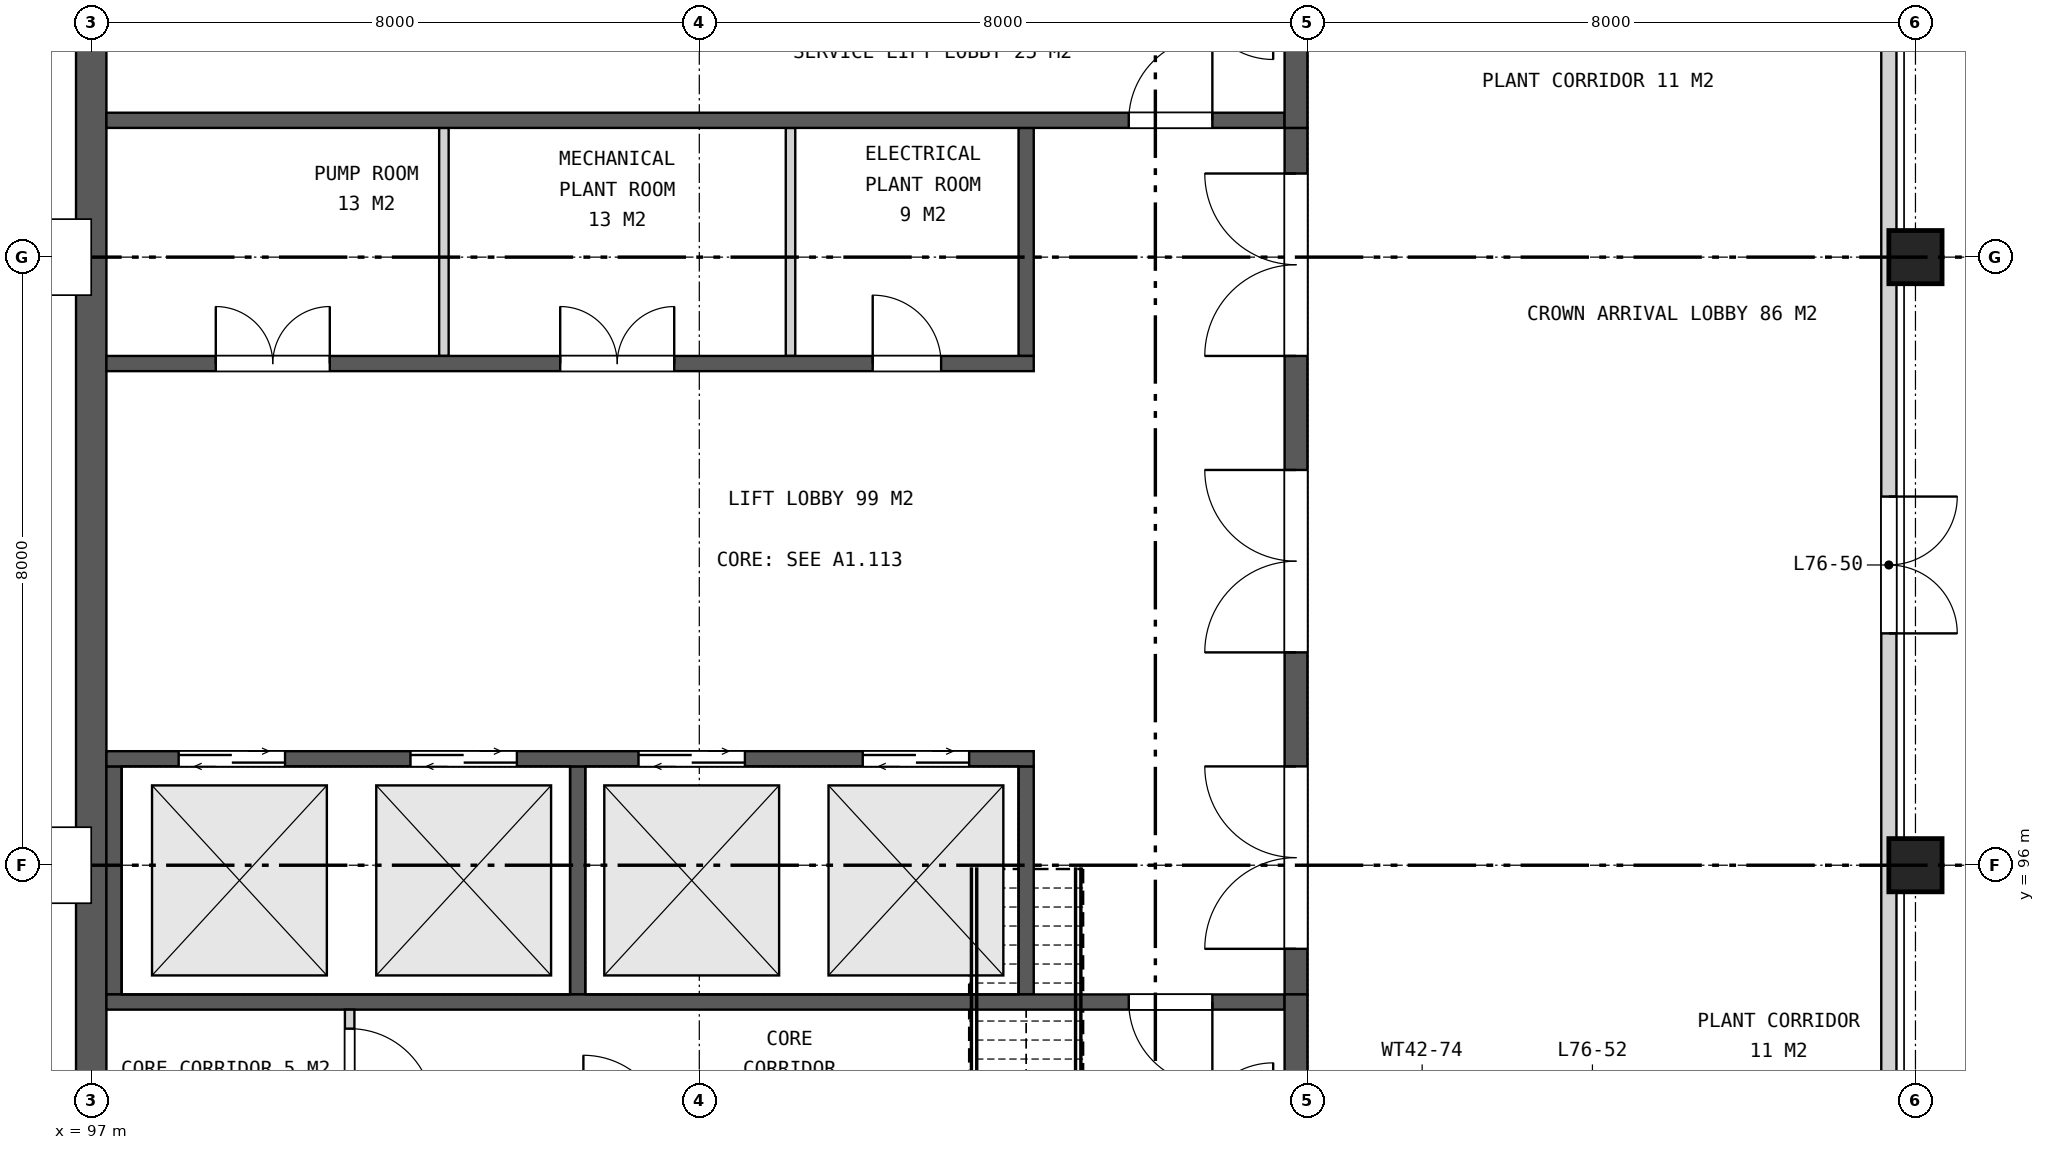
"""IFC4 building model, lengths in metres.
Left out: names, types, materials, properties, quantities, classifications, styles, units other than length and angle.
Written with IfcOpenShell. Run it as: python <this file> out.ifc"""

import sys

from ifc_helpers import new_model, si_unit, direction, frame, frame_2d, origin, origin_2d, place, context, subcontext, project, spatial, rectangle, extrude, element, fill, save


model = new_model("IFC4")
c1 = context("Model", 3, precision=1e-05, world=origin(), true_north=direction((0.0, 1.0)))
c2 = subcontext(c1, "Body", "Model", "MODEL_VIEW")
j1 = project(units=[si_unit("LENGTHUNIT", "METRE"), si_unit("PLANEANGLEUNIT", "RADIAN")], contexts=[c1])
p1 = place(None, origin())
s1 = spatial("IfcSite", under=j1, at=p1, CompositionType="ELEMENT")
p2 = place(p1, origin())
s2 = spatial("IfcBuilding", under=s1, at=p2, CompositionType="ELEMENT")
p3 = place(p2, frame((0.0, 0.0, 349.1)))
s3 = spatial("IfcBuildingStorey", under=s2, at=p3, CompositionType="ELEMENT", Elevation=349.1)
for number, where, z_axis, x_axis in (
    (1, (121.0, 96.0, 0.0), (0.0, 0.0, 1.0), (1.0, 0.0, 0.0)),
    (2, (121.0, 104.0, 0.0), (0.0, 0.0, 1.0), (1.0, 0.0, 0.0)),
):
    element("IfcColumn", number, at=place(p3, frame(where, z_axis=z_axis, x_axis=x_axis)), inside=s3, PredefinedType="COLUMN", context=c2, shape_type="SweptSolid", body=[
        extrude(rectangle(XDim=0.7, YDim=0.7, at=origin_2d()), origin(), (0.0, 0.0, 1.0), 10.23),
    ])
p4 = place(p3, frame((97.0, 111.8, 0.0), z_axis=(0.0, 0.0, 1.0), x_axis=(0.0, -1.0, 0.0)))
e3 = element("IfcWall", 3, at=p4, inside=s3, PredefinedType="SHEAR", context=c2, shape_type="SweptSolid", body=[
    extrude(rectangle(XDim=23.6, YDim=0.4, at=frame_2d((11.8, 0.0))), origin(), (0.0, 0.0, 1.0), 12.0),
])
p5 = place(p3, frame((112.85, 105.7, 0.0), z_axis=(0.0, 0.0, 1.0), x_axis=(0.0, -1.0, 0.0)))
e4 = element("IfcWall", 4, at=p5, inside=s3, PredefinedType="SHEAR", context=c2, shape_type="SweptSolid", body=[
    extrude(rectangle(XDim=11.4, YDim=0.3, at=frame_2d((5.7, 0.0))), origin(), (0.0, 0.0, 1.0), 12.0),
])
p6 = place(p5, frame((0.6, 0.0, 0.0)))
e5 = element("IfcOpeningElement", 5, at=p6, cuts=e4, PredefinedType="OPENING", context=c2, shape_type="SweptSolid", body=[
    extrude(rectangle(XDim=2.4, YDim=2.4, at=frame_2d((1.2, 1.2))), frame((0.0, 0.16, 0.0), z_axis=(0.0, -1.0, 0.0), x_axis=(1.0, 0.0, 0.0)), (0.0, 0.0, 1.0), 0.32),
])
p7 = place(p5, frame((4.5, 0.0, 0.0)))
e6 = element("IfcOpeningElement", 6, at=p7, cuts=e4, PredefinedType="OPENING", context=c2, shape_type="SweptSolid", body=[
    extrude(rectangle(XDim=2.4, YDim=2.4, at=frame_2d((1.2, 1.2))), frame((0.0, 0.16, 0.0), z_axis=(0.0, -1.0, 0.0), x_axis=(1.0, 0.0, 0.0)), (0.0, 0.0, 1.0), 0.32),
])
p8 = place(p5, frame((8.4, 0.0, 0.0)))
e7 = element("IfcOpeningElement", 7, at=p8, cuts=e4, PredefinedType="OPENING", context=c2, shape_type="SweptSolid", body=[
    extrude(rectangle(XDim=2.4, YDim=2.4, at=frame_2d((1.2, 1.2))), frame((0.0, 0.16, 0.0), z_axis=(0.0, -1.0, 0.0), x_axis=(1.0, 0.0, 0.0)), (0.0, 0.0, 1.0), 0.32),
])
for number, where, z_axis, x_axis in (
    (8, (109.3, 97.3, 0.0), (0.0, 0.0, 1.0), (0.0, -1.0, 0.0)),
    (9, (103.4, 97.3, 0.0), (0.0, 0.0, 1.0), (0.0, -1.0, 0.0)),
    (10, (97.3, 97.3, 0.0), (0.0, 0.0, 1.0), (0.0, -1.0, 0.0)),
):
    element("IfcWall", number, at=place(p3, frame(where, z_axis=z_axis, x_axis=x_axis)), inside=s3, PredefinedType="SHEAR", context=c2, shape_type="SweptSolid", body=[
        extrude(rectangle(XDim=3.0, YDim=0.2, at=frame_2d((1.5, 0.0))), origin(), (0.0, 0.0, 1.0), 9.2),
    ])
p9 = place(p3, frame((109.4, 97.4, 0.0), z_axis=(0.0, 0.0, 1.0), x_axis=(-1.0, 0.0, 0.0)))
e11 = element("IfcWall", 11, at=p9, inside=s3, PredefinedType="SHEAR", context=c2, shape_type="SweptSolid", body=[
    extrude(rectangle(XDim=12.2, YDim=0.2, at=frame_2d((6.1, 0.0))), origin(), (0.0, 0.0, 1.0), 9.2),
])
p10 = place(p9, frame((0.85, 0.0, 0.0)))
e12 = element("IfcOpeningElement", 12, at=p10, cuts=e11, PredefinedType="OPENING", context=c2, shape_type="SweptSolid", body=[
    extrude(rectangle(XDim=1.4, YDim=2.1, at=frame_2d((0.7, 1.05))), frame((0.0, 0.11, 0.0), z_axis=(0.0, -1.0, 0.0), x_axis=(1.0, 0.0, 0.0)), (0.0, 0.0, 1.0), 0.22),
])
p11 = place(p9, frame((3.8, 0.0, 0.0)))
e13 = element("IfcOpeningElement", 13, at=p11, cuts=e11, PredefinedType="OPENING", context=c2, shape_type="SweptSolid", body=[
    extrude(rectangle(XDim=1.4, YDim=2.1, at=frame_2d((0.7, 1.05))), frame((0.0, 0.11, 0.0), z_axis=(0.0, -1.0, 0.0), x_axis=(1.0, 0.0, 0.0)), (0.0, 0.0, 1.0), 0.22),
])
p12 = place(p9, frame((6.8, 0.0, 0.0)))
e14 = element("IfcOpeningElement", 14, at=p12, cuts=e11, PredefinedType="OPENING", context=c2, shape_type="SweptSolid", body=[
    extrude(rectangle(XDim=1.4, YDim=2.1, at=frame_2d((0.7, 1.05))), frame((0.0, 0.11, 0.0), z_axis=(0.0, -1.0, 0.0), x_axis=(1.0, 0.0, 0.0)), (0.0, 0.0, 1.0), 0.22),
])
p13 = place(p9, frame((9.85, 0.0, 0.0)))
e15 = element("IfcOpeningElement", 15, at=p13, cuts=e11, PredefinedType="OPENING", context=c2, shape_type="SweptSolid", body=[
    extrude(rectangle(XDim=1.4, YDim=2.1, at=frame_2d((0.7, 1.05))), frame((0.0, 0.11, 0.0), z_axis=(0.0, -1.0, 0.0), x_axis=(1.0, 0.0, 0.0)), (0.0, 0.0, 1.0), 0.22),
])
p14 = place(p3, frame((109.3, 105.7, 0.0), z_axis=(0.0, 0.0, 1.0), x_axis=(0.0, -1.0, 0.0)))
e16 = element("IfcWall", 16, at=p14, inside=s3, PredefinedType="SHEAR", context=c2, shape_type="SweptSolid", body=[
    extrude(rectangle(XDim=3.0, YDim=0.2, at=frame_2d((1.5, 0.0))), origin(), (0.0, 0.0, 1.0), 9.2),
])
for number, where, z_axis, x_axis in (
    (17, (106.2, 105.7, 0.0), (0.0, 0.0, 1.0), (0.0, -1.0, 0.0)),
    (18, (101.64, 105.7, 0.0), (0.0, 0.0, 1.0), (0.0, -1.0, 0.0)),
):
    element("IfcWall", number, at=place(p3, frame(where, z_axis=z_axis, x_axis=x_axis)), inside=s3, PredefinedType="PARTITIONING", context=c2, shape_type="SweptSolid", body=[
        extrude(rectangle(XDim=3.0, YDim=0.125, at=frame_2d((1.5, 0.0))), origin(), (0.0, 0.0, 1.0), 9.2),
    ])
p15 = place(p3, frame((109.4, 102.6, 0.0), z_axis=(0.0, 0.0, 1.0), x_axis=(-1.0, 0.0, 0.0)))
e19 = element("IfcWall", 19, at=p15, inside=s3, PredefinedType="SHEAR", context=c2, shape_type="SweptSolid", body=[
    extrude(rectangle(XDim=12.2, YDim=0.2, at=frame_2d((6.1, 0.0))), origin(), (0.0, 0.0, 1.0), 9.2),
])
p16 = place(p15, frame((1.219, 0.0, 0.0)))
e20 = element("IfcOpeningElement", 20, at=p16, cuts=e19, PredefinedType="OPENING", context=c2, shape_type="SweptSolid", body=[
    extrude(rectangle(XDim=0.9, YDim=2.1, at=frame_2d((0.45, 1.05))), frame((0.0, 0.11, 0.0), z_axis=(0.0, -1.0, 0.0), x_axis=(1.0, 0.0, 0.0)), (0.0, 0.0, 1.0), 0.22),
])
p17 = place(p15, frame((4.73, 0.0, 0.0)))
e21 = element("IfcOpeningElement", 21, at=p17, cuts=e19, PredefinedType="OPENING", context=c2, shape_type="SweptSolid", body=[
    extrude(rectangle(XDim=1.5, YDim=2.1, at=frame_2d((0.75, 1.05))), frame((0.0, 0.11, 0.0), z_axis=(0.0, -1.0, 0.0), x_axis=(1.0, 0.0, 0.0)), (0.0, 0.0, 1.0), 0.22),
])
p18 = place(p15, frame((9.261, 0.0, 0.0)))
e22 = element("IfcOpeningElement", 22, at=p18, cuts=e19, PredefinedType="OPENING", context=c2, shape_type="SweptSolid", body=[
    extrude(rectangle(XDim=1.5, YDim=2.1, at=frame_2d((0.75, 1.05))), frame((0.0, 0.11, 0.0), z_axis=(0.0, -1.0, 0.0), x_axis=(1.0, 0.0, 0.0)), (0.0, 0.0, 1.0), 0.22),
])
p19 = place(p3, frame((112.7, 94.2, 0.0), z_axis=(0.0, 0.0, 1.0), x_axis=(-1.0, 0.0, 0.0)))
e23 = element("IfcWall", 23, at=p19, inside=s3, PredefinedType="SHEAR", context=c2, shape_type="SweptSolid", body=[
    extrude(rectangle(XDim=15.5, YDim=0.2, at=frame_2d((7.75, 0.0))), origin(), (0.0, 0.0, 1.0), 9.2),
])
p20 = place(p19, frame((0.95, 0.0, 0.0)))
e24 = element("IfcOpeningElement", 24, at=p20, cuts=e23, PredefinedType="OPENING", context=c2, shape_type="SweptSolid", body=[
    extrude(rectangle(XDim=1.1, YDim=2.1, at=frame_2d((0.55, 1.05))), frame((0.0, 0.11, 0.0), z_axis=(0.0, -1.0, 0.0), x_axis=(1.0, 0.0, 0.0)), (0.0, 0.0, 1.0), 0.22),
])
p21 = place(p3, frame((112.85, 94.3, 0.0), z_axis=(0.0, 0.0, 1.0), x_axis=(0.0, -1.0, 0.0)))
e25 = element("IfcWall", 25, at=p21, inside=s3, PredefinedType="SHEAR", context=c2, shape_type="SweptSolid", body=[
    extrude(rectangle(XDim=6.05, YDim=0.3, at=frame_2d((3.025, 0.0))), origin(), (0.0, 0.0, 1.0), 12.0),
])
p22 = place(p3, frame((100.4, 94.1, 0.0), z_axis=(0.0, 0.0, 1.0), x_axis=(0.0, -1.0, 0.0)))
e26 = element("IfcWall", 26, at=p22, inside=s3, PredefinedType="PARTITIONING", context=c2, shape_type="SweptSolid", body=[
    extrude(rectangle(XDim=1.6, YDim=0.125, at=frame_2d((0.8, 0.0))), origin(), (0.0, 0.0, 1.0), 9.2),
])
p23 = place(p22, frame((0.25, 0.0, 0.0)))
e27 = element("IfcOpeningElement", 27, at=p23, cuts=e26, PredefinedType="OPENING", context=c2, shape_type="SweptSolid", body=[
    extrude(rectangle(XDim=1.1, YDim=2.1, at=frame_2d((0.55, 1.05))), frame((0.0, 0.073, 0.0), z_axis=(0.0, -1.0, 0.0), x_axis=(1.0, 0.0, 0.0)), (0.0, 0.0, 1.0), 0.145),
])
p24 = place(p3, frame((112.7, 105.8, 0.0), z_axis=(0.0, 0.0, 1.0), x_axis=(-1.0, 0.0, 0.0)))
e28 = element("IfcWall", 28, at=p24, inside=s3, PredefinedType="SHEAR", context=c2, shape_type="SweptSolid", body=[
    extrude(rectangle(XDim=15.5, YDim=0.2, at=frame_2d((7.75, 0.0))), origin(), (0.0, 0.0, 1.0), 9.2),
])
p25 = place(p24, frame((0.95, 0.0, 0.0)))
e29 = element("IfcOpeningElement", 29, at=p25, cuts=e28, PredefinedType="OPENING", context=c2, shape_type="SweptSolid", body=[
    extrude(rectangle(XDim=1.1, YDim=2.1, at=frame_2d((0.55, 1.05))), frame((0.0, 0.11, 0.0), z_axis=(0.0, -1.0, 0.0), x_axis=(1.0, 0.0, 0.0)), (0.0, 0.0, 1.0), 0.22),
])
p26 = place(p3, frame((112.85, 111.75, 0.0), z_axis=(0.0, 0.0, 1.0), x_axis=(0.0, -1.0, 0.0)))
e30 = element("IfcWall", 30, at=p26, inside=s3, PredefinedType="SHEAR", context=c2, shape_type="SweptSolid", body=[
    extrude(rectangle(XDim=6.05, YDim=0.3, at=frame_2d((3.025, 0.0))), origin(), (0.0, 0.0, 1.0), 12.0),
])
p27 = place(p3, frame((120.65, 71.73, 0.0), z_axis=(0.0, 0.0, 1.0), x_axis=(0.0, 1.0, 0.0)))
e31 = element("IfcWall", 31, at=p27, inside=s3, PredefinedType="SOLIDWALL", context=c2, shape_type="SweptSolid", body=[
    extrude(rectangle(XDim=56.54, YDim=0.2, at=frame_2d((28.27, 0.0))), origin(), (0.0, 0.0, 1.0), 11.6),
])
p28 = place(p27, frame((27.32, 0.0, 0.0)))
e32 = element("IfcOpeningElement", 32, at=p28, cuts=e31, PredefinedType="OPENING", context=c2, shape_type="SweptSolid", body=[
    extrude(rectangle(XDim=1.8, YDim=2.1, at=frame_2d((0.9, 1.05))), frame((0.0, 0.11, 0.0), z_axis=(0.0, -1.0, 0.0), x_axis=(1.0, 0.0, 0.0)), (0.0, 0.0, 1.0), 0.22),
])
p29 = place(p6, frame((2.4, 0.0, 0.0), z_axis=(0.0, 0.0, 1.0), x_axis=(-1.0, 0.0, 0.0)))
e33 = element("IfcDoor", 33, at=p29, inside=s3, OperationType="DOUBLE_DOOR_SINGLE_SWING", PredefinedType="DOOR", context=c2, shape_type="SweptSolid", body=[
    extrude(rectangle(XDim=2.4, YDim=2.4, at=frame_2d((1.2, 1.2))), frame((0.0, 0.025, 0.0), z_axis=(0.0, -1.0, 0.0), x_axis=(1.0, 0.0, 0.0)), (0.0, 0.0, 1.0), 0.05),
])
fill(e5, e33)
p30 = place(p7, frame((2.4, 0.0, 0.0), z_axis=(0.0, 0.0, 1.0), x_axis=(-1.0, 0.0, 0.0)))
e34 = element("IfcDoor", 34, at=p30, inside=s3, OperationType="DOUBLE_DOOR_SINGLE_SWING", PredefinedType="DOOR", context=c2, shape_type="SweptSolid", body=[
    extrude(rectangle(XDim=2.4, YDim=2.4, at=frame_2d((1.2, 1.2))), frame((0.0, 0.025, 0.0), z_axis=(0.0, -1.0, 0.0), x_axis=(1.0, 0.0, 0.0)), (0.0, 0.0, 1.0), 0.05),
])
fill(e6, e34)
p31 = place(p8, frame((2.4, 0.0, 0.0), z_axis=(0.0, 0.0, 1.0), x_axis=(-1.0, 0.0, 0.0)))
e35 = element("IfcDoor", 35, at=p31, inside=s3, OperationType="DOUBLE_DOOR_SINGLE_SWING", PredefinedType="DOOR", context=c2, shape_type="SweptSolid", body=[
    extrude(rectangle(XDim=2.4, YDim=2.4, at=frame_2d((1.2, 1.2))), frame((0.0, 0.025, 0.0), z_axis=(0.0, -1.0, 0.0), x_axis=(1.0, 0.0, 0.0)), (0.0, 0.0, 1.0), 0.05),
])
fill(e7, e35)
p32 = place(p10, origin())
e36 = element("IfcDoor", 36, at=p32, inside=s3, OperationType="DOUBLE_DOOR_SLIDING", PredefinedType="DOOR", context=c2, shape_type="SweptSolid", body=[
    extrude(rectangle(XDim=1.4, YDim=2.1, at=frame_2d((0.7, 1.05))), frame((0.0, 0.025, 0.0), z_axis=(0.0, -1.0, 0.0), x_axis=(1.0, 0.0, 0.0)), (0.0, 0.0, 1.0), 0.05),
])
fill(e12, e36)
p33 = place(p11, origin())
e37 = element("IfcDoor", 37, at=p33, inside=s3, OperationType="DOUBLE_DOOR_SLIDING", PredefinedType="DOOR", context=c2, shape_type="SweptSolid", body=[
    extrude(rectangle(XDim=1.4, YDim=2.1, at=frame_2d((0.7, 1.05))), frame((0.0, 0.025, 0.0), z_axis=(0.0, -1.0, 0.0), x_axis=(1.0, 0.0, 0.0)), (0.0, 0.0, 1.0), 0.05),
])
fill(e13, e37)
p34 = place(p12, origin())
e38 = element("IfcDoor", 38, at=p34, inside=s3, OperationType="DOUBLE_DOOR_SLIDING", PredefinedType="DOOR", context=c2, shape_type="SweptSolid", body=[
    extrude(rectangle(XDim=1.4, YDim=2.1, at=frame_2d((0.7, 1.05))), frame((0.0, 0.025, 0.0), z_axis=(0.0, -1.0, 0.0), x_axis=(1.0, 0.0, 0.0)), (0.0, 0.0, 1.0), 0.05),
])
fill(e14, e38)
p35 = place(p13, origin())
e39 = element("IfcDoor", 39, at=p35, inside=s3, OperationType="DOUBLE_DOOR_SLIDING", PredefinedType="DOOR", context=c2, shape_type="SweptSolid", body=[
    extrude(rectangle(XDim=1.4, YDim=2.1, at=frame_2d((0.7, 1.05))), frame((0.0, 0.025, 0.0), z_axis=(0.0, -1.0, 0.0), x_axis=(1.0, 0.0, 0.0)), (0.0, 0.0, 1.0), 0.05),
])
fill(e15, e39)
p36 = place(p16, frame((0.9, 0.0, 0.0), z_axis=(0.0, 0.0, 1.0), x_axis=(-1.0, 0.0, 0.0)))
e40 = element("IfcDoor", 40, at=p36, inside=s3, OperationType="SINGLE_SWING_LEFT", PredefinedType="DOOR", context=c2, shape_type="SweptSolid", body=[
    extrude(rectangle(XDim=0.9, YDim=2.1, at=frame_2d((0.45, 1.05))), frame((0.0, 0.025, 0.0), z_axis=(0.0, -1.0, 0.0), x_axis=(1.0, 0.0, 0.0)), (0.0, 0.0, 1.0), 0.05),
])
fill(e20, e40)
p37 = place(p17, frame((1.5, 0.0, 0.0), z_axis=(0.0, 0.0, 1.0), x_axis=(-1.0, 0.0, 0.0)))
e41 = element("IfcDoor", 41, at=p37, inside=s3, OperationType="DOUBLE_DOOR_SINGLE_SWING", PredefinedType="DOOR", context=c2, shape_type="SweptSolid", body=[
    extrude(rectangle(XDim=1.5, YDim=2.1, at=frame_2d((0.75, 1.05))), frame((0.0, 0.025, 0.0), z_axis=(0.0, -1.0, 0.0), x_axis=(1.0, 0.0, 0.0)), (0.0, 0.0, 1.0), 0.05),
])
fill(e21, e41)
p38 = place(p18, frame((1.5, 0.0, 0.0), z_axis=(0.0, 0.0, 1.0), x_axis=(-1.0, 0.0, 0.0)))
e42 = element("IfcDoor", 42, at=p38, inside=s3, OperationType="DOUBLE_DOOR_SINGLE_SWING", PredefinedType="DOOR", context=c2, shape_type="SweptSolid", body=[
    extrude(rectangle(XDim=1.5, YDim=2.1, at=frame_2d((0.75, 1.05))), frame((0.0, 0.025, 0.0), z_axis=(0.0, -1.0, 0.0), x_axis=(1.0, 0.0, 0.0)), (0.0, 0.0, 1.0), 0.05),
])
fill(e22, e42)
p39 = place(p20, origin())
e43 = element("IfcDoor", 43, at=p39, inside=s3, OperationType="SINGLE_SWING_LEFT", PredefinedType="DOOR", context=c2, shape_type="SweptSolid", body=[
    extrude(rectangle(XDim=1.1, YDim=2.1, at=frame_2d((0.55, 1.05))), frame((0.0, 0.025, 0.0), z_axis=(0.0, -1.0, 0.0), x_axis=(1.0, 0.0, 0.0)), (0.0, 0.0, 1.0), 0.05),
])
fill(e24, e43)
p40 = place(p23, origin())
e44 = element("IfcDoor", 44, at=p40, inside=s3, OperationType="SINGLE_SWING_RIGHT", PredefinedType="DOOR", context=c2, shape_type="SweptSolid", body=[
    extrude(rectangle(XDim=1.1, YDim=2.1, at=frame_2d((0.55, 1.05))), frame((0.0, 0.025, 0.0), z_axis=(0.0, -1.0, 0.0), x_axis=(1.0, 0.0, 0.0)), (0.0, 0.0, 1.0), 0.05),
])
fill(e27, e44)
p41 = place(p25, frame((1.1, 0.0, 0.0), z_axis=(0.0, 0.0, 1.0), x_axis=(-1.0, 0.0, 0.0)))
e45 = element("IfcDoor", 45, at=p41, inside=s3, OperationType="SINGLE_SWING_RIGHT", PredefinedType="DOOR", context=c2, shape_type="SweptSolid", body=[
    extrude(rectangle(XDim=1.1, YDim=2.1, at=frame_2d((0.55, 1.05))), frame((0.0, 0.025, 0.0), z_axis=(0.0, -1.0, 0.0), x_axis=(1.0, 0.0, 0.0)), (0.0, 0.0, 1.0), 0.05),
])
fill(e29, e45)
p42 = place(p28, frame((1.8, 0.0, 0.0), z_axis=(0.0, 0.0, 1.0), x_axis=(-1.0, 0.0, 0.0)))
e46 = element("IfcDoor", 46, at=p42, inside=s3, OperationType="DOUBLE_DOOR_SINGLE_SWING", PredefinedType="DOOR", context=c2, shape_type="SweptSolid", body=[
    extrude(rectangle(XDim=1.8, YDim=2.1, at=frame_2d((0.9, 1.05))), frame((0.0, 0.025, 0.0), z_axis=(0.0, -1.0, 0.0), x_axis=(1.0, 0.0, 0.0)), (0.0, 0.0, 1.0), 0.05),
])
fill(e32, e46)
save(model, sys.argv[1])
